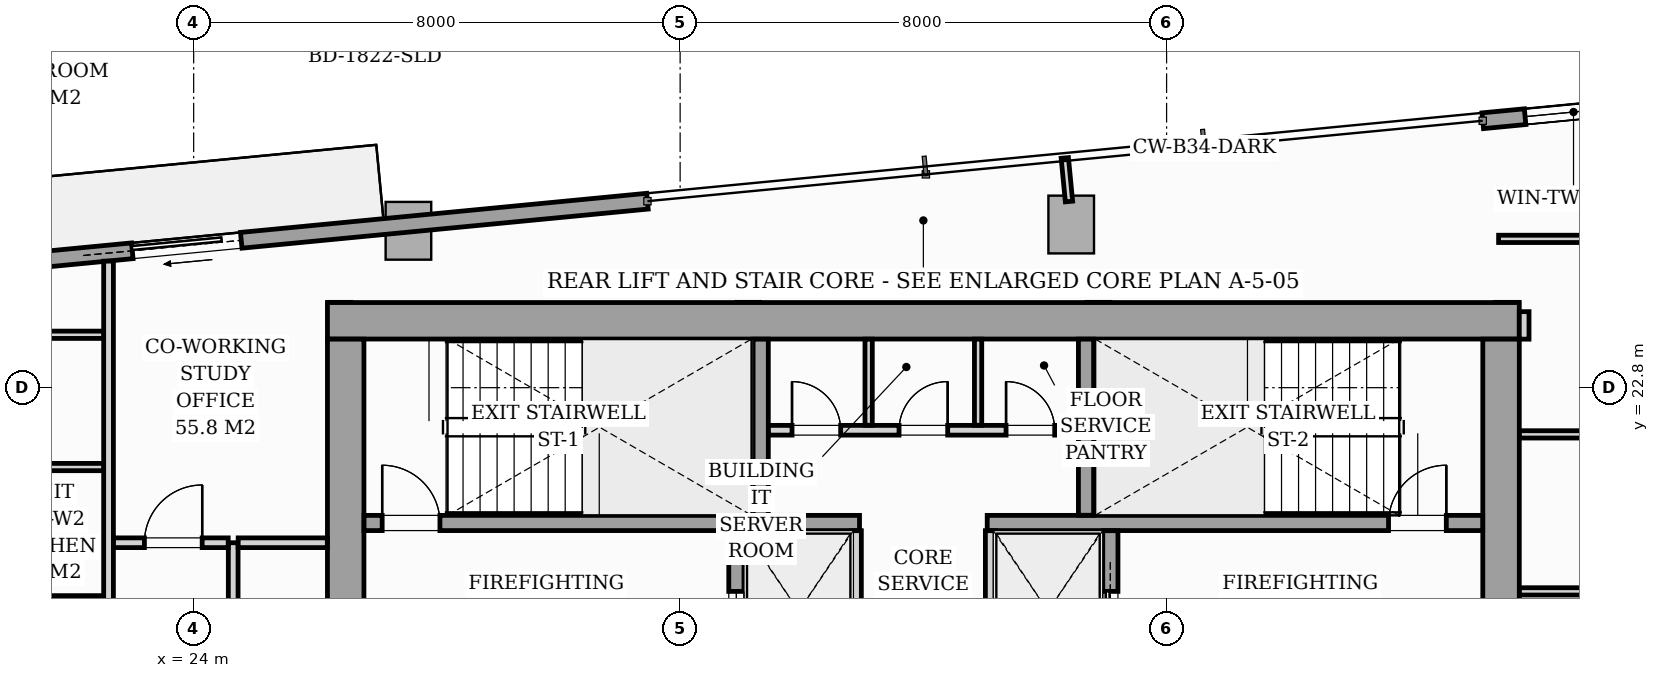
"""IFC4 building model, lengths in metres.
Left out: names, types, materials, properties, quantities, classifications, styles, units other than length and angle.
Written with IfcOpenShell. Run it as: python <this file> out.ifc"""

import sys

from ifc_helpers import new_model, si_unit, direction, frame, frame_2d, origin, origin_2d, place, context, subcontext, project, spatial, rectangle, i_section, extrude, source, transform, mapped, element, fill, save


model = new_model("IFC4")
c1 = context("Model", 3, precision=1e-05, world=origin(), true_north=direction((0.0, 1.0)))
c2 = subcontext(c1, "Body", "Model", "MODEL_VIEW")
j1 = project(units=[si_unit("LENGTHUNIT", "METRE"), si_unit("PLANEANGLEUNIT", "RADIAN")], contexts=[c1])
p1 = place(None, origin())
s1 = spatial("IfcSite", under=j1, at=p1, CompositionType="ELEMENT")
p2 = place(p1, origin())
s2 = spatial("IfcBuilding", under=s1, at=p2, CompositionType="ELEMENT")
p3 = place(p2, frame((0.0, 0.0, 179.4)))
s3 = spatial("IfcBuildingStorey", under=s2, at=p3, CompositionType="ELEMENT", Elevation=179.4)
m1 = source(origin(), c2, "Body", "SweptSolid", [
    extrude(i_section(OverallWidth=0.416, OverallDepth=0.446, WebThickness=0.039, FlangeThickness=0.063, FilletRadius=0.018, at=origin_2d()), origin(), (0.0, 0.0, 1.0), 3.196),
])
for number, where, z_axis, x_axis in (
    (1, (26.4, 24.0, 0.002), (0.0, 0.0, 1.0), (1.0, 0.0, 0.0)),
    (2, (33.12, 24.0, 0.002), (0.0, 0.0, 1.0), (1.0, 0.0, 0.0)),
    (3, (38.88, 24.0, 0.002), (0.0, 0.0, 1.0), (1.0, 0.0, 0.0)),
    (4, (45.6, 24.0, 0.002), (0.0, 0.0, 1.0), (1.0, 0.0, 0.0)),
):
    element("IfcColumn", number, at=place(p3, frame(where, z_axis=z_axis, x_axis=x_axis)), inside=s3, PredefinedType="PILASTER", context=c2, shape_type="MappedRepresentation", body=[
        mapped(m1, transform((0.0, 0.0, 0.0), scale=1.0)),
    ])
m2 = source(origin(), c2, "Body", "SweptSolid", [
    extrude(rectangle(XDim=0.75, YDim=0.95, at=origin_2d()), origin(), (0.0, 0.0, 1.0), 3.196),
])
for number, where, z_axis, x_axis in (
    (5, (27.532, 25.38, 0.002), (0.0, 0.0, 1.0), (0.995, 0.096, 0.0)),
    (6, (38.431, 25.483, 0.002), (0.0, 0.0, 1.0), (0.995, 0.096, 0.0)),
):
    element("IfcColumn", number, at=place(p3, frame(where, z_axis=z_axis, x_axis=x_axis)), inside=s3, PredefinedType="COLUMN", context=c2, shape_type="MappedRepresentation", body=[
        mapped(m2, transform((0.0, 0.0, 0.0), scale=1.0)),
    ])
p4 = place(p3, frame((15.437, 24.324, 0.0), z_axis=(0.0, 0.0, 1.0), x_axis=(0.995395627913, 0.095851676732, 0.0)))
e7 = element("IfcWall", 7, at=p4, inside=s3, PredefinedType="STANDARD", context=c2, shape_type="SweptSolid", body=[
    extrude(rectangle(XDim=16.1, YDim=0.26, at=frame_2d((8.05, 0.0))), origin(), (0.0, 0.0, 1.0), 2.94),
])
p5 = place(p4, frame((7.589, 0.0, 0.0)))
e8 = element("IfcOpeningElement", 8, at=p5, cuts=e7, PredefinedType="OPENING", context=c2, shape_type="SweptSolid", body=[
    extrude(rectangle(XDim=1.8, YDim=2.06, at=frame_2d((0.9, 1.03))), frame((0.0, 0.14, 0.0), z_axis=(0.0, -1.0, 0.0), x_axis=(1.0, 0.0, 0.0)), (0.0, 0.0, 1.0), 0.28),
])
p6 = place(p4, frame((2.05, 0.0, 0.65)))
e9 = element("IfcOpeningElement", 9, at=p6, cuts=e7, PredefinedType="OPENING", context=c2, shape_type="SweptSolid", body=[
    extrude(rectangle(XDim=1.6, YDim=1.5, at=frame_2d((0.8, 0.75))), frame((0.0, 0.14, 0.0), z_axis=(0.0, -1.0, 0.0), x_axis=(1.0, 0.0, 0.0)), (0.0, 0.0, 1.0), 0.28),
])
p7 = place(p3, frame((45.199, 27.19, 0.0), z_axis=(0.0, 0.0, 1.0), x_axis=(0.995397074604, 0.095836652014, 0.0)))
e10 = element("IfcWall", 10, at=p7, inside=s3, PredefinedType="STANDARD", context=c2, shape_type="SweptSolid", body=[
    extrude(rectangle(XDim=16.1, YDim=0.26, at=frame_2d((8.05, 0.0))), origin(), (0.0, 0.0, 1.0), 2.94),
])
p8 = place(p7, frame((7.55, 0.0, 0.0)))
e11 = element("IfcOpeningElement", 11, at=p8, cuts=e10, PredefinedType="OPENING", context=c2, shape_type="SweptSolid", body=[
    extrude(rectangle(XDim=1.8, YDim=2.06, at=frame_2d((0.9, 1.03))), frame((0.0, 0.14, 0.0), z_axis=(0.0, -1.0, 0.0), x_axis=(1.0, 0.0, 0.0)), (0.0, 0.0, 1.0), 0.28),
])
p9 = place(p7, frame((0.7, 0.0, 0.65)))
e12 = element("IfcOpeningElement", 12, at=p9, cuts=e10, PredefinedType="OPENING", context=c2, shape_type="SweptSolid", body=[
    extrude(rectangle(XDim=1.6, YDim=1.5, at=frame_2d((0.8, 0.75))), frame((0.0, 0.14, 0.0), z_axis=(0.0, -1.0, 0.0), x_axis=(1.0, 0.0, 0.0)), (0.0, 0.0, 1.0), 0.28),
])
p10 = place(p3, frame((26.2, 23.9, 0.0), z_axis=(0.0, 0.0, 1.0), x_axis=(1.0, 0.0, 0.0)))
e13 = element("IfcWall", 13, at=p10, inside=s3, PredefinedType="SHEAR", context=c2, shape_type="SweptSolid", body=[
    extrude(rectangle(XDim=19.6, YDim=0.6, at=frame_2d((9.8, 0.0))), origin(), (0.0, 0.0, 1.0), 3.2),
])
for number, where, z_axis, x_axis in (
    (14, (26.5, 17.802, 0.0), (0.0, 0.0, 1.0), (0.0, 1.0, 0.0)),
    (15, (45.5, 17.802, 0.0), (0.0, 0.0, 1.0), (0.0, 1.0, 0.0)),
):
    element("IfcWall", number, at=place(p3, frame(where, z_axis=z_axis, x_axis=x_axis)), inside=s3, PredefinedType="SHEAR", context=c2, shape_type="SweptSolid", body=[
        extrude(rectangle(XDim=5.796, YDim=0.6, at=frame_2d((2.898, 0.0))), origin(), (0.0, 0.0, 1.0), 3.2),
    ])
p11 = place(p3, frame((26.802, 20.575, 0.0), z_axis=(0.0, 0.0, 1.0), x_axis=(1.0, 0.0, 0.0)))
e16 = element("IfcWall", 16, at=p11, inside=s3, PredefinedType="SOLIDWALL", context=c2, shape_type="SweptSolid", body=[
    extrude(rectangle(XDim=8.148, YDim=0.25, at=frame_2d((4.074, 0.0))), origin(), (0.0, 0.0, 1.0), 3.2),
])
p12 = place(p11, frame((0.298, 0.0, 0.0)))
e17 = element("IfcOpeningElement", 17, at=p12, cuts=e16, PredefinedType="OPENING", context=c2, shape_type="SweptSolid", body=[
    extrude(rectangle(XDim=0.95, YDim=2.06, at=frame_2d((0.475, 1.03))), frame((0.0, 0.135, 0.0), z_axis=(0.0, -1.0, 0.0), x_axis=(1.0, 0.0, 0.0)), (0.0, 0.0, 1.0), 0.27),
])
p13 = place(p3, frame((37.05, 20.575, 0.0), z_axis=(0.0, 0.0, 1.0), x_axis=(1.0, 0.0, 0.0)))
e18 = element("IfcWall", 18, at=p13, inside=s3, PredefinedType="SOLIDWALL", context=c2, shape_type="SweptSolid", body=[
    extrude(rectangle(XDim=8.148, YDim=0.25, at=frame_2d((4.074, 0.0))), origin(), (0.0, 0.0, 1.0), 3.2),
])
p14 = place(p13, frame((6.6, 0.0, 0.0)))
e19 = element("IfcOpeningElement", 19, at=p14, cuts=e18, PredefinedType="OPENING", context=c2, shape_type="SweptSolid", body=[
    extrude(rectangle(XDim=0.95, YDim=2.06, at=frame_2d((0.475, 1.03))), frame((0.0, 0.135, 0.0), z_axis=(0.0, -1.0, 0.0), x_axis=(1.0, 0.0, 0.0)), (0.0, 0.0, 1.0), 0.27),
])
for number, where, z_axis, x_axis in (
    (20, (33.325, 20.702, 0.0), (0.0, 0.0, 1.0), (0.0, 1.0, 0.0)),
    (21, (38.675, 20.702, 0.0), (0.0, 0.0, 1.0), (0.0, 1.0, 0.0)),
):
    element("IfcWall", number, at=place(p3, frame(where, z_axis=z_axis, x_axis=x_axis)), inside=s3, PredefinedType="SOLIDWALL", context=c2, shape_type="SweptSolid", body=[
        extrude(rectangle(XDim=2.896, YDim=0.25, at=frame_2d((1.448, 0.0))), origin(), (0.0, 0.0, 1.0), 3.2),
    ])
p15 = place(p3, frame((32.925, 17.802, 0.0), z_axis=(0.0, 0.0, 1.0), x_axis=(0.0, 1.0, 0.0)))
e22 = element("IfcWall", 22, at=p15, inside=s3, PredefinedType="SOLIDWALL", context=c2, shape_type="SweptSolid", body=[
    extrude(rectangle(XDim=2.646, YDim=0.25, at=frame_2d((1.323, 0.0))), origin(), (0.0, 0.0, 1.0), 3.2),
])
p16 = place(p15, frame((0.548, 0.0, 0.0)))
e23 = element("IfcOpeningElement", 23, at=p16, cuts=e22, PredefinedType="OPENING", context=c2, shape_type="SweptSolid", body=[
    extrude(rectangle(XDim=1.1, YDim=2.08, at=frame_2d((0.55, 1.04))), frame((0.0, 0.135, 0.0), z_axis=(0.0, -1.0, 0.0), x_axis=(1.0, 0.0, 0.0)), (0.0, 0.0, 1.0), 0.27),
])
for number, where, z_axis, x_axis in (
    (24, (34.9, 17.802, 0.0), (0.0, 0.0, 1.0), (0.0, 1.0, 0.0)),
    (25, (37.1, 17.802, 0.0), (0.0, 0.0, 1.0), (0.0, 1.0, 0.0)),
):
    element("IfcWall", number, at=place(p3, frame(where, z_axis=z_axis, x_axis=x_axis)), inside=s3, PredefinedType="PARTITIONING", context=c2, shape_type="SweptSolid", body=[
        extrude(rectangle(XDim=2.646, YDim=0.16, at=frame_2d((1.323, 0.0))), origin(), (0.0, 0.0, 1.0), 2.94),
    ])
p17 = place(p3, frame((39.075, 17.802, 0.0), z_axis=(0.0, 0.0, 1.0), x_axis=(0.0, 1.0, 0.0)))
e26 = element("IfcWall", 26, at=p17, inside=s3, PredefinedType="SOLIDWALL", context=c2, shape_type="SweptSolid", body=[
    extrude(rectangle(XDim=2.646, YDim=0.25, at=frame_2d((1.323, 0.0))), origin(), (0.0, 0.0, 1.0), 3.2),
])
p18 = place(p17, frame((0.548, 0.0, 0.0)))
e27 = element("IfcOpeningElement", 27, at=p18, cuts=e26, PredefinedType="OPENING", context=c2, shape_type="SweptSolid", body=[
    extrude(rectangle(XDim=1.1, YDim=2.08, at=frame_2d((0.55, 1.04))), frame((0.0, 0.135, 0.0), z_axis=(0.0, -1.0, 0.0), x_axis=(1.0, 0.0, 0.0)), (0.0, 0.0, 1.0), 0.27),
])
p19 = place(p3, frame((33.452, 22.1, 0.0), z_axis=(0.0, 0.0, 1.0), x_axis=(1.0, 0.0, 0.0)))
e28 = element("IfcWall", 28, at=p19, inside=s3, PredefinedType="PARTITIONING", context=c2, shape_type="SweptSolid", body=[
    extrude(rectangle(XDim=5.096, YDim=0.16, at=frame_2d((2.548, 0.0))), origin(), (0.0, 0.0, 1.0), 2.94),
])
p20 = place(p19, frame((0.388, 0.0, 0.0)))
e29 = element("IfcOpeningElement", 29, at=p20, cuts=e28, PredefinedType="OPENING", context=c2, shape_type="SweptSolid", body=[
    extrude(rectangle(XDim=0.8, YDim=2.05, at=frame_2d((0.4, 1.025))), frame((0.0, 0.09, 0.0), z_axis=(0.0, -1.0, 0.0), x_axis=(1.0, 0.0, 0.0)), (0.0, 0.0, 1.0), 0.18),
])
p21 = place(p19, frame((2.148, 0.0, 0.0)))
e30 = element("IfcOpeningElement", 30, at=p21, cuts=e28, PredefinedType="OPENING", context=c2, shape_type="SweptSolid", body=[
    extrude(rectangle(XDim=0.8, YDim=2.05, at=frame_2d((0.4, 1.025))), frame((0.0, 0.09, 0.0), z_axis=(0.0, -1.0, 0.0), x_axis=(1.0, 0.0, 0.0)), (0.0, 0.0, 1.0), 0.18),
])
p22 = place(p19, frame((3.908, 0.0, 0.0)))
e31 = element("IfcOpeningElement", 31, at=p22, cuts=e28, PredefinedType="OPENING", context=c2, shape_type="SweptSolid", body=[
    extrude(rectangle(XDim=0.8, YDim=2.05, at=frame_2d((0.4, 1.025))), frame((0.0, 0.09, 0.0), z_axis=(0.0, -1.0, 0.0), x_axis=(1.0, 0.0, 0.0)), (0.0, 0.0, 1.0), 0.18),
])
for number, where, z_axis, x_axis in (
    (32, (35.1, 22.182, 0.0), (0.0, 0.0, 1.0), (0.0, 1.0, 0.0)),
    (33, (36.9, 22.182, 0.0), (0.0, 0.0, 1.0), (0.0, 1.0, 0.0)),
):
    element("IfcWall", number, at=place(p3, frame(where, z_axis=z_axis, x_axis=x_axis)), inside=s3, PredefinedType="PARTITIONING", context=c2, shape_type="SweptSolid", body=[
        extrude(rectangle(XDim=1.416, YDim=0.12, at=frame_2d((0.708, 0.0))), origin(), (0.0, 0.0, 1.0), 2.94),
    ])
p23 = place(p3, frame((22.6, 13.332, 0.0), z_axis=(0.0, 0.0, 1.0), x_axis=(0.0, 1.0, 0.0)))
e34 = element("IfcWall", 34, at=p23, inside=s3, PredefinedType="PARTITIONING", context=c2, shape_type="SweptSolid", body=[
    extrude(rectangle(XDim=11.549, YDim=0.16, at=frame_2d((5.774, 0.0))), origin(), (0.0, 0.0, 1.0), 2.94),
])
p24 = place(p23, frame((0.493, 0.0, 0.0)))
e35 = element("IfcOpeningElement", 35, at=p24, cuts=e34, PredefinedType="OPENING", context=c2, shape_type="SweptSolid", body=[
    extrude(rectangle(XDim=0.95, YDim=2.06, at=frame_2d((0.475, 1.03))), frame((0.0, 0.09, 0.0), z_axis=(0.0, -1.0, 0.0), x_axis=(1.0, 0.0, 0.0)), (0.0, 0.0, 1.0), 0.18),
])
p25 = place(p23, frame((4.713, 0.0, 0.0)))
e36 = element("IfcOpeningElement", 36, at=p25, cuts=e34, PredefinedType="OPENING", context=c2, shape_type="SweptSolid", body=[
    extrude(rectangle(XDim=0.95, YDim=2.06, at=frame_2d((0.475, 1.03))), frame((0.0, 0.09, 0.0), z_axis=(0.0, -1.0, 0.0), x_axis=(1.0, 0.0, 0.0)), (0.0, 0.0, 1.0), 0.18),
])
p26 = place(p3, frame((45.88, 23.598, 0.0), z_axis=(0.0, 0.0, 1.0), x_axis=(0.0, 1.0, 0.0)))
e37 = element("IfcWall", 37, at=p26, inside=s3, PredefinedType="PARTITIONING", context=c2, shape_type="SweptSolid", body=[
    extrude(rectangle(XDim=0.452, YDim=0.16, at=frame_2d((0.226, 0.0))), origin(), (0.0, 0.0, 1.0), 2.94),
])
for number, where, z_axis, x_axis in (
    (38, (20.262, 21.495, 0.0), (0.0, 0.0, 1.0), (1.0, 0.0, 0.0)),
    (39, (20.262, 19.32, 0.0), (0.0, 0.0, 1.0), (1.0, 0.0, 0.0)),
):
    element("IfcWall", number, at=place(p3, frame(where, z_axis=z_axis, x_axis=x_axis)), inside=s3, PredefinedType="PARTITIONING", context=c2, shape_type="SweptSolid", body=[
        extrude(rectangle(XDim=2.256, YDim=0.12, at=frame_2d((1.128, 0.0))), origin(), (0.0, 0.0, 1.0), 2.94),
    ])
p27 = place(p3, frame((20.262, 23.67, 0.0), z_axis=(0.0, 0.0, 1.0), x_axis=(1.0, 0.0, 0.0)))
e40 = element("IfcWall", 40, at=p27, inside=s3, PredefinedType="PARTITIONING", context=c2, shape_type="SweptSolid", body=[
    extrude(rectangle(XDim=2.256, YDim=0.12, at=frame_2d((1.128, 0.0))), origin(), (0.0, 0.0, 1.0), 2.3),
])
p28 = place(p3, frame((45.802, 19.45, 0.0), z_axis=(0.0, 0.0, 1.0), x_axis=(1.0, 0.0, 0.0)))
e41 = element("IfcWall", 41, at=p28, inside=s3, PredefinedType="PARTITIONING", context=c2, shape_type="SweptSolid", body=[
    extrude(rectangle(XDim=2.416, YDim=0.12, at=frame_2d((1.208, 0.0))), origin(), (0.0, 0.0, 1.0), 2.94),
])
p29 = place(p3, frame((45.46, 25.247, 0.0), z_axis=(0.0, 0.0, 1.0), x_axis=(1.0, 0.0, 0.0)))
e42 = element("IfcWall", 42, at=p29, inside=s3, PredefinedType="PARTITIONING", context=c2, shape_type="SweptSolid", body=[
    extrude(rectangle(XDim=9.461, YDim=0.12, at=frame_2d((4.73, 0.0))), origin(), (0.0, 0.0, 1.0), 2.94),
])
p30 = place(p29, frame((4.826, 0.0, 0.0)))
e43 = element("IfcOpeningElement", 43, at=p30, cuts=e42, PredefinedType="OPENING", context=c2, shape_type="SweptSolid", body=[
    extrude(rectangle(XDim=0.85, YDim=2.05, at=frame_2d((0.425, 1.025))), frame((0.0, 0.07, 0.0), z_axis=(0.0, -1.0, 0.0), x_axis=(1.0, 0.0, 0.0)), (0.0, 0.0, 1.0), 0.14),
])
p31 = place(p3, frame((45.802, 22.032, 0.0), z_axis=(0.0, 0.0, 1.0), x_axis=(1.0, 0.0, 0.0)))
e44 = element("IfcWall", 44, at=p31, inside=s3, PredefinedType="PARTITIONING", context=c2, shape_type="SweptSolid", body=[
    extrude(rectangle(XDim=18.499, YDim=0.12, at=frame_2d((9.25, 0.0))), origin(), (0.0, 0.0, 1.0), 2.94),
])
p32 = place(p31, frame((8.911, 0.0, 0.0)))
e45 = element("IfcOpeningElement", 45, at=p32, cuts=e44, PredefinedType="OPENING", context=c2, shape_type="SweptSolid", body=[
    extrude(rectangle(XDim=0.85, YDim=2.05, at=frame_2d((0.425, 1.025))), frame((0.0, 0.07, 0.0), z_axis=(0.0, -1.0, 0.0), x_axis=(1.0, 0.0, 0.0)), (0.0, 0.0, 1.0), 0.14),
])
p33 = place(p3, frame((24.65, 14.66, 0.0), z_axis=(0.0, 0.0, 1.0), x_axis=(0.0, 1.0, 0.0)))
e46 = element("IfcWall", 46, at=p33, inside=s3, PredefinedType="PARTITIONING", context=c2, shape_type="SweptSolid", body=[
    extrude(rectangle(XDim=5.59, YDim=0.16, at=frame_2d((2.795, 0.0))), origin(), (0.0, 0.0, 1.0), 2.94),
])
p34 = place(p33, frame((3.54, 0.0, 0.0)))
e47 = element("IfcOpeningElement", 47, at=p34, cuts=e46, PredefinedType="OPENING", context=c2, shape_type="SweptSolid", body=[
    extrude(rectangle(XDim=0.95, YDim=2.06, at=frame_2d((0.475, 1.03))), frame((0.0, 0.09, 0.0), z_axis=(0.0, -1.0, 0.0), x_axis=(1.0, 0.0, 0.0)), (0.0, 0.0, 1.0), 0.18),
])
p35 = place(p3, frame((22.682, 20.25, 0.0), z_axis=(0.0, 0.0, 1.0), x_axis=(1.0, 0.0, 0.0)))
e48 = element("IfcWall", 48, at=p35, inside=s3, PredefinedType="PARTITIONING", context=c2, shape_type="SweptSolid", body=[
    extrude(rectangle(XDim=1.886, YDim=0.16, at=frame_2d((0.943, 0.0))), origin(), (0.0, 0.0, 1.0), 2.94),
])
p36 = place(p35, frame((0.508, 0.0, 0.0)))
e49 = element("IfcOpeningElement", 49, at=p36, cuts=e48, PredefinedType="OPENING", context=c2, shape_type="SweptSolid", body=[
    extrude(rectangle(XDim=0.95, YDim=2.06, at=frame_2d((0.475, 1.03))), frame((0.0, 0.09, 0.0), z_axis=(0.0, -1.0, 0.0), x_axis=(1.0, 0.0, 0.0)), (0.0, 0.0, 1.0), 0.18),
])
p37 = place(p3, frame((24.732, 20.25, 0.0), z_axis=(0.0, 0.0, 1.0), x_axis=(1.0, 0.0, 0.0)))
e50 = element("IfcWall", 50, at=p37, inside=s3, PredefinedType="PARTITIONING", context=c2, shape_type="SweptSolid", body=[
    extrude(rectangle(XDim=1.466, YDim=0.16, at=frame_2d((0.733, 0.0))), origin(), (0.0, 0.0, 1.0), 2.94),
])
p38 = place(p3, frame((38.395, 25.861, 0.0), z_axis=(0.0, 0.0, 1.0), x_axis=(-0.095977354523, 0.995383517755, 0.0)))
e51 = element("IfcWall", 51, at=p38, inside=s3, PredefinedType="PARTITIONING", context=c2, shape_type="SweptSolid", body=[
    extrude(rectangle(XDim=0.72, YDim=0.12, at=frame_2d((0.36, 0.0))), origin(), (0.0, 0.0, 1.0), 2.94),
])
m3 = source(origin(), c2, "Body", "SweptSolid", [
    extrude(rectangle(XDim=1.8, YDim=2.06, at=frame_2d((0.9, 1.03))), frame((0.0, 0.025, 0.0), z_axis=(0.0, -1.0, 0.0), x_axis=(1.0, 0.0, 0.0)), (0.0, 0.0, 1.0), 0.05),
])
p39 = place(p5, origin())
e52 = element("IfcDoor", 52, at=p39, inside=s3, OperationType="SLIDING_TO_LEFT", PredefinedType="DOOR", context=c2, shape_type="MappedRepresentation", body=[
    mapped(m3, transform((0.0, 0.0, 0.0), scale=1.0)),
])
fill(e8, e52)
m4 = source(origin(), c2, "Body", "SweptSolid", [
    extrude(rectangle(XDim=1.6, YDim=1.5, at=frame_2d((0.8, 0.75))), frame((0.0, 0.03, 0.0), z_axis=(0.0, -1.0, 0.0), x_axis=(1.0, 0.0, 0.0)), (0.0, 0.0, 1.0), 0.06),
])
p40 = place(p9, origin())
e53 = element("IfcWindow", 53, at=p40, inside=s3, PartitioningType="SINGLE_PANEL", PredefinedType="WINDOW", context=c2, shape_type="MappedRepresentation", body=[
    mapped(m4, transform((0.0, 0.0, 0.0), scale=1.0)),
])
fill(e12, e53)
m5 = source(origin(), c2, "Body", "SweptSolid", [
    extrude(rectangle(XDim=0.95, YDim=2.06, at=frame_2d((0.475, 1.03))), frame((0.0, 0.025, 0.0), z_axis=(0.0, -1.0, 0.0), x_axis=(1.0, 0.0, 0.0)), (0.0, 0.0, 1.0), 0.05),
])
p41 = place(p12, origin())
e54 = element("IfcDoor", 54, at=p41, inside=s3, OperationType="SINGLE_SWING_LEFT", PredefinedType="DOOR", context=c2, shape_type="MappedRepresentation", body=[
    mapped(m5, transform((0.0, 0.0, 0.0), scale=1.0)),
])
fill(e17, e54)
p42 = place(p14, origin())
e55 = element("IfcDoor", 55, at=p42, inside=s3, OperationType="SINGLE_SWING_RIGHT", PredefinedType="DOOR", context=c2, shape_type="MappedRepresentation", body=[
    mapped(m5, transform((0.0, 0.0, 0.0), scale=1.0)),
])
fill(e19, e55)
m6 = source(origin(), c2, "Body", "SweptSolid", [
    extrude(rectangle(XDim=1.1, YDim=2.08, at=frame_2d((0.55, 1.04))), frame((0.0, 0.025, 0.0), z_axis=(0.0, -1.0, 0.0), x_axis=(1.0, 0.0, 0.0)), (0.0, 0.0, 1.0), 0.05),
])
p43 = place(p16, origin())
e56 = element("IfcDoor", 56, at=p43, inside=s3, OperationType="SLIDING_TO_LEFT", PredefinedType="DOOR", context=c2, shape_type="MappedRepresentation", body=[
    mapped(m6, transform((0.0, 0.0, 0.0), scale=1.0)),
])
fill(e23, e56)
p44 = place(p18, origin())
e57 = element("IfcDoor", 57, at=p44, inside=s3, OperationType="SLIDING_TO_RIGHT", PredefinedType="DOOR", context=c2, shape_type="MappedRepresentation", body=[
    mapped(m6, transform((0.0, 0.0, 0.0), scale=1.0)),
])
fill(e27, e57)
m7 = source(origin(), c2, "Body", "SweptSolid", [
    extrude(rectangle(XDim=0.8, YDim=2.05, at=frame_2d((0.4, 1.025))), frame((0.0, 0.025, 0.0), z_axis=(0.0, -1.0, 0.0), x_axis=(1.0, 0.0, 0.0)), (0.0, 0.0, 1.0), 0.05),
])
p45 = place(p20, origin())
e58 = element("IfcDoor", 58, at=p45, inside=s3, OperationType="SINGLE_SWING_LEFT", PredefinedType="DOOR", context=c2, shape_type="MappedRepresentation", body=[
    mapped(m7, transform((0.0, 0.0, 0.0), scale=1.0)),
])
fill(e29, e58)
p46 = place(p21, origin())
e59 = element("IfcDoor", 59, at=p46, inside=s3, OperationType="SINGLE_SWING_RIGHT", PredefinedType="DOOR", context=c2, shape_type="MappedRepresentation", body=[
    mapped(m7, transform((0.0, 0.0, 0.0), scale=1.0)),
])
fill(e30, e59)
p47 = place(p22, origin())
e60 = element("IfcDoor", 60, at=p47, inside=s3, OperationType="SINGLE_SWING_LEFT", PredefinedType="DOOR", context=c2, shape_type="MappedRepresentation", body=[
    mapped(m7, transform((0.0, 0.0, 0.0), scale=1.0)),
])
fill(e31, e60)
m8 = source(origin(), c2, "Body", "SweptSolid", [
    extrude(rectangle(XDim=0.95, YDim=2.06, at=frame_2d((0.475, 1.03))), frame((0.0, 0.025, 0.0), z_axis=(0.0, -1.0, 0.0), x_axis=(1.0, 0.0, 0.0)), (0.0, 0.0, 1.0), 0.05),
])
p48 = place(p36, origin())
e61 = element("IfcDoor", 61, at=p48, inside=s3, OperationType="SINGLE_SWING_RIGHT", PredefinedType="DOOR", context=c2, shape_type="MappedRepresentation", body=[
    mapped(m8, transform((0.0, 0.0, 0.0), scale=1.0)),
])
fill(e49, e61)
save(model, sys.argv[1])
